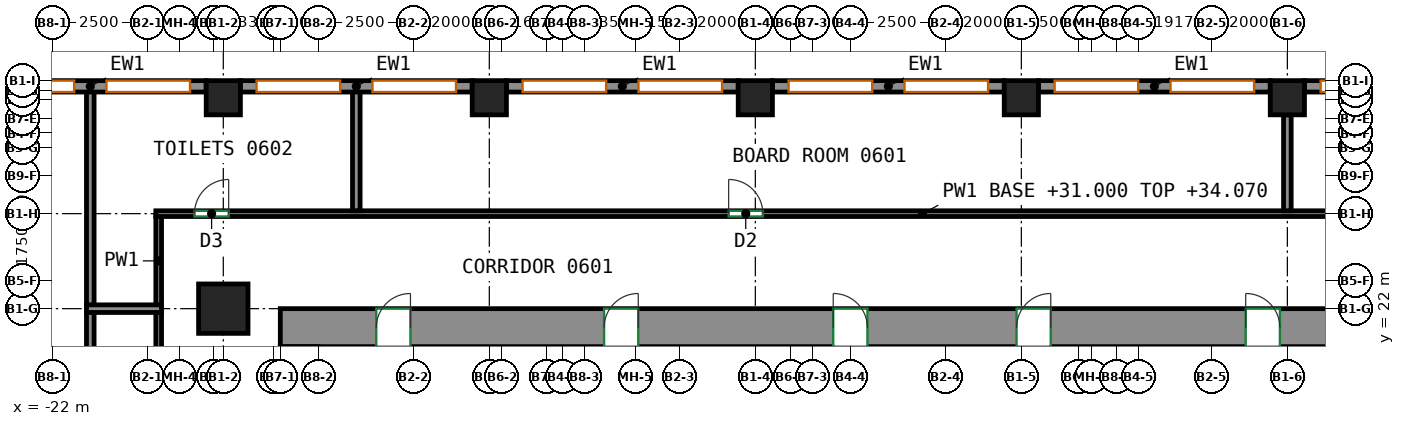
"""IFC4 building model, lengths in metres.
Left out: names, types, materials, properties, quantities, classifications, styles, units other than length and angle.
Written with IfcOpenShell. Run it as: python <this file> out.ifc"""

import sys

from ifc_helpers import new_model, si_unit, direction, frame, frame_2d, origin, origin_2d, place, context, subcontext, project, spatial, rectangle, extrude, source, transform, mapped, element, fill, save


model = new_model("IFC4")
c1 = context("Model", 3, precision=1e-05, world=origin(), true_north=direction((0.0, 1.0)))
c2 = subcontext(c1, "Body", "Model", "MODEL_VIEW")
j1 = project(units=[si_unit("LENGTHUNIT", "METRE"), si_unit("PLANEANGLEUNIT", "RADIAN")], contexts=[c1])
p1 = place(None, origin())
s1 = spatial("IfcSite", under=j1, at=p1, CompositionType="ELEMENT")
p2 = place(p1, origin())
s2 = spatial("IfcBuilding", under=s1, at=p2, CompositionType="ELEMENT")
p3 = place(p2, frame((0.0, 0.0, 31.0)))
s3 = spatial("IfcBuildingStorey", under=s2, at=p3, CompositionType="ELEMENT", Elevation=31.0)
m1 = source(origin(), c2, "Body", "SweptSolid", [
    extrude(rectangle(XDim=1.3, YDim=1.3, at=origin_2d()), origin(), (0.0, 0.0, 1.0), 3.72),
])
p4 = place(p3, frame((-17.5, 22.0, 0.0), z_axis=(0.0, 0.0, 1.0), x_axis=(1.0, 0.0, 0.0)))
e1 = element("IfcColumn", 1, at=p4, inside=s3, PredefinedType="COLUMN", context=c2, shape_type="MappedRepresentation", body=[
    mapped(m1, transform((0.0, 0.0, 0.0))),
])
m2 = source(origin(), c2, "Body", "SweptSolid", [
    extrude(rectangle(XDim=0.9, YDim=0.9, at=origin_2d()), origin(), (0.0, 0.0, 1.0), 3.72),
])
for number, where, z_axis, x_axis in (
    (2, (-17.5, 27.55, 0.0), (0.0, 0.0, 1.0), (1.0, 0.0, 0.0)),
    (3, (-10.5, 27.55, 0.0), (0.0, 0.0, 1.0), (1.0, 0.0, 0.0)),
    (4, (-3.5, 27.55, 0.0), (0.0, 0.0, 1.0), (1.0, 0.0, 0.0)),
    (5, (3.5, 27.55, 0.0), (0.0, 0.0, 1.0), (1.0, 0.0, 0.0)),
    (6, (10.5, 27.55, 0.0), (0.0, 0.0, 1.0), (1.0, 0.0, 0.0)),
):
    element("IfcColumn", number, at=place(p3, frame(where, z_axis=z_axis, x_axis=x_axis)), inside=s3, PredefinedType="COLUMN", context=c2, shape_type="MappedRepresentation", body=[
        mapped(m2, transform((0.0, 0.0, 0.0))),
    ])
m3 = source(origin(), c2, "Body", "SweptSolid", [
    extrude(rectangle(XDim=34.1, YDim=1.0, at=frame_2d((17.05, 0.0))), origin(), (0.0, 0.0, 1.0), 3.72),
])
p5 = place(p3, frame((-16.0, 21.5, 0.0), z_axis=(0.0, 0.0, 1.0), x_axis=(1.0, 0.0, 0.0)))
e7 = element("IfcWall", 7, at=p5, inside=s3, PredefinedType="SHEAR", context=c2, shape_type="MappedRepresentation", body=[
    mapped(m3, transform((0.0, 0.0, 0.0))),
])
p6 = place(p5, frame((8.52, 0.0, 0.0)))
e8 = element("IfcOpeningElement", 8, at=p6, cuts=e7, PredefinedType="OPENING", context=c2, shape_type="SweptSolid", body=[
    extrude(rectangle(XDim=0.9, YDim=2.1, at=frame_2d((0.45, 1.05))), frame((0.0, 0.51, 0.0), z_axis=(0.0, -1.0, 0.0), x_axis=(1.0, 0.0, 0.0)), (0.0, 0.0, 1.0), 1.02),
])
p7 = place(p5, frame((14.55, 0.0, 0.0)))
e9 = element("IfcOpeningElement", 9, at=p7, cuts=e7, PredefinedType="OPENING", context=c2, shape_type="SweptSolid", body=[
    extrude(rectangle(XDim=0.9, YDim=2.1, at=frame_2d((0.45, 1.05))), frame((0.0, 0.51, 0.0), z_axis=(0.0, -1.0, 0.0), x_axis=(1.0, 0.0, 0.0)), (0.0, 0.0, 1.0), 1.02),
])
p8 = place(p5, frame((19.374, 0.0, 0.0)))
e10 = element("IfcOpeningElement", 10, at=p8, cuts=e7, PredefinedType="OPENING", context=c2, shape_type="SweptSolid", body=[
    extrude(rectangle(XDim=0.9, YDim=2.1, at=frame_2d((0.45, 1.05))), frame((0.0, 0.51, 0.0), z_axis=(0.0, -1.0, 0.0), x_axis=(1.0, 0.0, 0.0)), (0.0, 0.0, 1.0), 1.02),
])
p9 = place(p5, frame((25.404, 0.0, 0.0)))
e11 = element("IfcOpeningElement", 11, at=p9, cuts=e7, PredefinedType="OPENING", context=c2, shape_type="SweptSolid", body=[
    extrude(rectangle(XDim=0.9, YDim=2.1, at=frame_2d((0.45, 1.05))), frame((0.0, 0.51, 0.0), z_axis=(0.0, -1.0, 0.0), x_axis=(1.0, 0.0, 0.0)), (0.0, 0.0, 1.0), 1.02),
])
p10 = place(p5, frame((2.525, 0.0, 0.0)))
e12 = element("IfcOpeningElement", 12, at=p10, cuts=e7, PredefinedType="OPENING", context=c2, shape_type="SweptSolid", body=[
    extrude(rectangle(XDim=0.9, YDim=2.1, at=frame_2d((0.45, 1.05))), frame((0.0, 0.51, 0.0), z_axis=(0.0, -1.0, 0.0), x_axis=(1.0, 0.0, 0.0)), (0.0, 0.0, 1.0), 1.02),
])
p11 = place(p5, frame((30.675, 0.0, 0.0)))
e13 = element("IfcOpeningElement", 13, at=p11, cuts=e7, PredefinedType="OPENING", context=c2, shape_type="SweptSolid", body=[
    extrude(rectangle(XDim=0.9, YDim=2.1, at=frame_2d((0.45, 1.05))), frame((0.0, 0.51, 0.0), z_axis=(0.0, -1.0, 0.0), x_axis=(1.0, 0.0, 0.0)), (0.0, 0.0, 1.0), 1.02),
])
m4 = source(origin(), c2, "Body", "SweptSolid", [
    extrude(rectangle(XDim=6.1, YDim=0.3, at=frame_2d((3.05, 0.0))), origin(), (0.0, 0.0, 1.0), 3.72),
])
p12 = place(p3, frame((17.05, 27.85, 0.0), z_axis=(0.0, 0.0, 1.0), x_axis=(-1.0, 0.0, 0.0)))
e14 = element("IfcWall", 14, at=p12, inside=s3, PredefinedType="SOLIDWALL", context=c2, shape_type="MappedRepresentation", body=[
    mapped(m4, transform((0.0, 0.0, 0.0))),
])
p13 = place(p12, frame((0.425, 0.0, 0.7)))
e15 = element("IfcOpeningElement", 15, at=p13, cuts=e14, PredefinedType="OPENING", context=c2, shape_type="SweptSolid", body=[
    extrude(rectangle(XDim=2.2, YDim=2.25, at=frame_2d((1.1, 1.125))), frame((0.0, 0.16, 0.0), z_axis=(0.0, -1.0, 0.0), x_axis=(1.0, 0.0, 0.0)), (0.0, 0.0, 1.0), 0.32),
])
p14 = place(p12, frame((3.475, 0.0, 0.7)))
e16 = element("IfcOpeningElement", 16, at=p14, cuts=e14, PredefinedType="OPENING", context=c2, shape_type="SweptSolid", body=[
    extrude(rectangle(XDim=2.2, YDim=2.25, at=frame_2d((1.1, 1.125))), frame((0.0, 0.16, 0.0), z_axis=(0.0, -1.0, 0.0), x_axis=(1.0, 0.0, 0.0)), (0.0, 0.0, 1.0), 0.32),
])
p15 = place(p3, frame((10.05, 27.85, 0.0), z_axis=(0.0, 0.0, 1.0), x_axis=(-1.0, 0.0, 0.0)))
e17 = element("IfcWall", 17, at=p15, inside=s3, PredefinedType="SOLIDWALL", context=c2, shape_type="MappedRepresentation", body=[
    mapped(m4, transform((0.0, 0.0, 0.0))),
])
p16 = place(p15, frame((0.425, 0.0, 0.7)))
e18 = element("IfcOpeningElement", 18, at=p16, cuts=e17, PredefinedType="OPENING", context=c2, shape_type="SweptSolid", body=[
    extrude(rectangle(XDim=2.2, YDim=2.25, at=frame_2d((1.1, 1.125))), frame((0.0, 0.16, 0.0), z_axis=(0.0, -1.0, 0.0), x_axis=(1.0, 0.0, 0.0)), (0.0, 0.0, 1.0), 0.32),
])
p17 = place(p15, frame((3.475, 0.0, 0.7)))
e19 = element("IfcOpeningElement", 19, at=p17, cuts=e17, PredefinedType="OPENING", context=c2, shape_type="SweptSolid", body=[
    extrude(rectangle(XDim=2.2, YDim=2.25, at=frame_2d((1.1, 1.125))), frame((0.0, 0.16, 0.0), z_axis=(0.0, -1.0, 0.0), x_axis=(1.0, 0.0, 0.0)), (0.0, 0.0, 1.0), 0.32),
])
p18 = place(p3, frame((3.05, 27.85, 0.0), z_axis=(0.0, 0.0, 1.0), x_axis=(-1.0, 0.0, 0.0)))
e20 = element("IfcWall", 20, at=p18, inside=s3, PredefinedType="SOLIDWALL", context=c2, shape_type="MappedRepresentation", body=[
    mapped(m4, transform((0.0, 0.0, 0.0))),
])
p19 = place(p18, frame((0.425, 0.0, 0.7)))
e21 = element("IfcOpeningElement", 21, at=p19, cuts=e20, PredefinedType="OPENING", context=c2, shape_type="SweptSolid", body=[
    extrude(rectangle(XDim=2.2, YDim=2.25, at=frame_2d((1.1, 1.125))), frame((0.0, 0.16, 0.0), z_axis=(0.0, -1.0, 0.0), x_axis=(1.0, 0.0, 0.0)), (0.0, 0.0, 1.0), 0.32),
])
p20 = place(p18, frame((3.475, 0.0, 0.7)))
e22 = element("IfcOpeningElement", 22, at=p20, cuts=e20, PredefinedType="OPENING", context=c2, shape_type="SweptSolid", body=[
    extrude(rectangle(XDim=2.2, YDim=2.25, at=frame_2d((1.1, 1.125))), frame((0.0, 0.16, 0.0), z_axis=(0.0, -1.0, 0.0), x_axis=(1.0, 0.0, 0.0)), (0.0, 0.0, 1.0), 0.32),
])
p21 = place(p3, frame((-3.95, 27.85, 0.0), z_axis=(0.0, 0.0, 1.0), x_axis=(-1.0, 0.0, 0.0)))
e23 = element("IfcWall", 23, at=p21, inside=s3, PredefinedType="SOLIDWALL", context=c2, shape_type="MappedRepresentation", body=[
    mapped(m4, transform((0.0, 0.0, 0.0))),
])
p22 = place(p21, frame((0.425, 0.0, 0.7)))
e24 = element("IfcOpeningElement", 24, at=p22, cuts=e23, PredefinedType="OPENING", context=c2, shape_type="SweptSolid", body=[
    extrude(rectangle(XDim=2.2, YDim=2.25, at=frame_2d((1.1, 1.125))), frame((0.0, 0.16, 0.0), z_axis=(0.0, -1.0, 0.0), x_axis=(1.0, 0.0, 0.0)), (0.0, 0.0, 1.0), 0.32),
])
p23 = place(p21, frame((3.475, 0.0, 0.7)))
e25 = element("IfcOpeningElement", 25, at=p23, cuts=e23, PredefinedType="OPENING", context=c2, shape_type="SweptSolid", body=[
    extrude(rectangle(XDim=2.2, YDim=2.25, at=frame_2d((1.1, 1.125))), frame((0.0, 0.16, 0.0), z_axis=(0.0, -1.0, 0.0), x_axis=(1.0, 0.0, 0.0)), (0.0, 0.0, 1.0), 0.32),
])
p24 = place(p3, frame((-10.95, 27.85, 0.0), z_axis=(0.0, 0.0, 1.0), x_axis=(-1.0, 0.0, 0.0)))
e26 = element("IfcWall", 26, at=p24, inside=s3, PredefinedType="SOLIDWALL", context=c2, shape_type="MappedRepresentation", body=[
    mapped(m4, transform((0.0, 0.0, 0.0))),
])
p25 = place(p24, frame((0.425, 0.0, 0.7)))
e27 = element("IfcOpeningElement", 27, at=p25, cuts=e26, PredefinedType="OPENING", context=c2, shape_type="SweptSolid", body=[
    extrude(rectangle(XDim=2.2, YDim=2.25, at=frame_2d((1.1, 1.125))), frame((0.0, 0.16, 0.0), z_axis=(0.0, -1.0, 0.0), x_axis=(1.0, 0.0, 0.0)), (0.0, 0.0, 1.0), 0.32),
])
p26 = place(p24, frame((3.475, 0.0, 0.7)))
e28 = element("IfcOpeningElement", 28, at=p26, cuts=e26, PredefinedType="OPENING", context=c2, shape_type="SweptSolid", body=[
    extrude(rectangle(XDim=2.2, YDim=2.25, at=frame_2d((1.1, 1.125))), frame((0.0, 0.16, 0.0), z_axis=(0.0, -1.0, 0.0), x_axis=(1.0, 0.0, 0.0)), (0.0, 0.0, 1.0), 0.32),
])
p27 = place(p3, frame((-17.95, 27.85, 0.0), z_axis=(0.0, 0.0, 1.0), x_axis=(-1.0, 0.0, 0.0)))
e29 = element("IfcWall", 29, at=p27, inside=s3, PredefinedType="SOLIDWALL", context=c2, shape_type="MappedRepresentation", body=[
    mapped(m4, transform((0.0, 0.0, 0.0))),
])
p28 = place(p27, frame((0.425, 0.0, 0.7)))
e30 = element("IfcOpeningElement", 30, at=p28, cuts=e29, PredefinedType="OPENING", context=c2, shape_type="SweptSolid", body=[
    extrude(rectangle(XDim=2.2, YDim=2.25, at=frame_2d((1.1, 1.125))), frame((0.0, 0.16, 0.0), z_axis=(0.0, -1.0, 0.0), x_axis=(1.0, 0.0, 0.0)), (0.0, 0.0, 1.0), 0.32),
])
p29 = place(p27, frame((3.475, 0.0, 0.7)))
e31 = element("IfcOpeningElement", 31, at=p29, cuts=e29, PredefinedType="OPENING", context=c2, shape_type="SweptSolid", body=[
    extrude(rectangle(XDim=2.2, YDim=2.25, at=frame_2d((1.1, 1.125))), frame((0.0, 0.16, 0.0), z_axis=(0.0, -1.0, 0.0), x_axis=(1.0, 0.0, 0.0)), (0.0, 0.0, 1.0), 0.32),
])
p30 = place(p3, frame((-19.2, 22.09, 0.0), z_axis=(0.0, 0.0, 1.0), x_axis=(0.0, 1.0, 0.0)))
e32 = element("IfcWall", 32, at=p30, inside=s3, PredefinedType="PARTITIONING", context=c2, shape_type="SweptSolid", body=[
    extrude(rectangle(XDim=2.335, YDim=0.15, at=frame_2d((1.167, 0.0))), origin(), (0.0, 0.0, 1.0), 3.72),
])
p31 = place(p3, frame((-19.275, 24.5, 0.0), z_axis=(0.0, 0.0, 1.0), x_axis=(1.0, 0.0, 0.0)))
e33 = element("IfcWall", 33, at=p31, inside=s3, PredefinedType="PARTITIONING", context=c2, shape_type="SweptSolid", body=[
    extrude(rectangle(XDim=40.35, YDim=0.15, at=frame_2d((20.175, 0.0))), origin(), (0.0, 0.0, 1.0), 3.07),
])
p32 = place(p31, frame((1.017, 0.0, 0.0)))
e34 = element("IfcOpeningElement", 34, at=p32, cuts=e33, PredefinedType="OPENING", context=c2, shape_type="SweptSolid", body=[
    extrude(rectangle(XDim=0.9, YDim=2.1, at=frame_2d((0.45, 1.05))), frame((0.0, 0.085, 0.0), z_axis=(0.0, -1.0, 0.0), x_axis=(1.0, 0.0, 0.0)), (0.0, 0.0, 1.0), 0.17),
])
p33 = place(p31, frame((15.073, 0.0, 0.0)))
e35 = element("IfcOpeningElement", 35, at=p33, cuts=e33, PredefinedType="OPENING", context=c2, shape_type="SweptSolid", body=[
    extrude(rectangle(XDim=0.9, YDim=2.1, at=frame_2d((0.45, 1.05))), frame((0.0, 0.085, 0.0), z_axis=(0.0, -1.0, 0.0), x_axis=(1.0, 0.0, 0.0)), (0.0, 0.0, 1.0), 0.17),
])
p34 = place(p31, frame((32.791, 0.0, 0.0)))
e36 = element("IfcOpeningElement", 36, at=p34, cuts=e33, PredefinedType="OPENING", context=c2, shape_type="SweptSolid", body=[
    extrude(rectangle(XDim=1.0, YDim=2.1, at=frame_2d((0.5, 1.05))), frame((0.0, 0.085, 0.0), z_axis=(0.0, -1.0, 0.0), x_axis=(1.0, 0.0, 0.0)), (0.0, 0.0, 1.0), 0.17),
])
p35 = place(p3, frame((-19.2, 8.09, 0.0), z_axis=(0.0, 0.0, 1.0), x_axis=(0.0, 1.0, 0.0)))
e37 = element("IfcWall", 37, at=p35, inside=s3, PredefinedType="PARTITIONING", context=c2, shape_type="SweptSolid", body=[
    extrude(rectangle(XDim=13.82, YDim=0.15, at=frame_2d((6.91, 0.0))), origin(), (0.0, 0.0, 1.0), 3.72),
])
p36 = place(p35, frame((11.919, 0.0, 0.0)))
e38 = element("IfcOpeningElement", 38, at=p36, cuts=e37, PredefinedType="OPENING", context=c2, shape_type="SweptSolid", body=[
    extrude(rectangle(XDim=0.9, YDim=2.1, at=frame_2d((0.45, 1.05))), frame((0.0, 0.085, 0.0), z_axis=(0.0, -1.0, 0.0), x_axis=(1.0, 0.0, 0.0)), (0.0, 0.0, 1.0), 0.17),
])
p37 = place(p3, frame((-21.0, 22.09, 0.0), z_axis=(0.0, 0.0, 1.0), x_axis=(0.0, 1.0, 0.0)))
e39 = element("IfcWall", 39, at=p37, inside=s3, PredefinedType="PARTITIONING", context=c2, shape_type="SweptSolid", body=[
    extrude(rectangle(XDim=5.66, YDim=0.2, at=frame_2d((2.83, 0.0))), origin(), (0.0, 0.0, 1.0), 3.72),
])
p38 = place(p3, frame((-21.0, 8.1, 0.0), z_axis=(0.0, 0.0, 1.0), x_axis=(0.0, 1.0, 0.0)))
e40 = element("IfcWall", 40, at=p38, inside=s3, PredefinedType="PARTITIONING", context=c2, shape_type="SweptSolid", body=[
    extrude(rectangle(XDim=13.81, YDim=0.2, at=frame_2d((6.905, 0.0))), origin(), (0.0, 0.0, 1.0), 3.72),
])
p39 = place(p3, frame((10.5, 24.576, 0.0), z_axis=(0.0, 0.0, 1.0), x_axis=(0.0, 1.0, 0.0)))
e41 = element("IfcWall", 41, at=p39, inside=s3, PredefinedType="PARTITIONING", context=c2, shape_type="SweptSolid", body=[
    extrude(rectangle(XDim=2.524, YDim=0.2, at=frame_2d((1.262, 0.0))), origin(), (0.0, 0.0, 1.0), 3.72),
])
p40 = place(p3, frame((-14.0, 24.576, 0.0), z_axis=(0.0, 0.0, 1.0), x_axis=(0.0, 1.0, 0.0)))
e42 = element("IfcWall", 42, at=p40, inside=s3, PredefinedType="PARTITIONING", context=c2, shape_type="SweptSolid", body=[
    extrude(rectangle(XDim=3.174, YDim=0.2, at=frame_2d((1.587, 0.0))), origin(), (0.0, 0.0, 1.0), 3.72),
])
p41 = place(p3, frame((-21.1, 22.0, 0.0), z_axis=(0.0, 0.0, 1.0), x_axis=(1.0, 0.0, 0.0)))
e43 = element("IfcWall", 43, at=p41, inside=s3, PredefinedType="PARTITIONING", context=c2, shape_type="SweptSolid", body=[
    extrude(rectangle(XDim=1.974, YDim=0.2, at=frame_2d((0.987, 0.0))), origin(), (0.0, 0.0, 1.0), 3.72),
])
p42 = place(p14, origin())
e44 = element("IfcWindow", 44, at=p42, inside=s3, PartitioningType="SINGLE_PANEL", PredefinedType="WINDOW", context=c2, shape_type="SweptSolid", body=[
    extrude(rectangle(XDim=2.2, YDim=2.25, at=frame_2d((1.1, 1.125))), frame((0.0, 0.03, 0.0), z_axis=(0.0, -1.0, 0.0), x_axis=(1.0, 0.0, 0.0)), (0.0, 0.0, 1.0), 0.06),
])
fill(e16, e44)
p43 = place(p16, origin())
e45 = element("IfcWindow", 45, at=p43, inside=s3, PartitioningType="SINGLE_PANEL", PredefinedType="WINDOW", context=c2, shape_type="SweptSolid", body=[
    extrude(rectangle(XDim=2.2, YDim=2.25, at=frame_2d((1.1, 1.125))), frame((0.0, 0.03, 0.0), z_axis=(0.0, -1.0, 0.0), x_axis=(1.0, 0.0, 0.0)), (0.0, 0.0, 1.0), 0.06),
])
fill(e18, e45)
p44 = place(p17, origin())
e46 = element("IfcWindow", 46, at=p44, inside=s3, PartitioningType="SINGLE_PANEL", PredefinedType="WINDOW", context=c2, shape_type="SweptSolid", body=[
    extrude(rectangle(XDim=2.2, YDim=2.25, at=frame_2d((1.1, 1.125))), frame((0.0, 0.03, 0.0), z_axis=(0.0, -1.0, 0.0), x_axis=(1.0, 0.0, 0.0)), (0.0, 0.0, 1.0), 0.06),
])
fill(e19, e46)
p45 = place(p19, origin())
e47 = element("IfcWindow", 47, at=p45, inside=s3, PartitioningType="SINGLE_PANEL", PredefinedType="WINDOW", context=c2, shape_type="SweptSolid", body=[
    extrude(rectangle(XDim=2.2, YDim=2.25, at=frame_2d((1.1, 1.125))), frame((0.0, 0.03, 0.0), z_axis=(0.0, -1.0, 0.0), x_axis=(1.0, 0.0, 0.0)), (0.0, 0.0, 1.0), 0.06),
])
fill(e21, e47)
p46 = place(p20, origin())
e48 = element("IfcWindow", 48, at=p46, inside=s3, PartitioningType="SINGLE_PANEL", PredefinedType="WINDOW", context=c2, shape_type="SweptSolid", body=[
    extrude(rectangle(XDim=2.2, YDim=2.25, at=frame_2d((1.1, 1.125))), frame((0.0, 0.03, 0.0), z_axis=(0.0, -1.0, 0.0), x_axis=(1.0, 0.0, 0.0)), (0.0, 0.0, 1.0), 0.06),
])
fill(e22, e48)
p47 = place(p22, origin())
e49 = element("IfcWindow", 49, at=p47, inside=s3, PartitioningType="SINGLE_PANEL", PredefinedType="WINDOW", context=c2, shape_type="SweptSolid", body=[
    extrude(rectangle(XDim=2.2, YDim=2.25, at=frame_2d((1.1, 1.125))), frame((0.0, 0.03, 0.0), z_axis=(0.0, -1.0, 0.0), x_axis=(1.0, 0.0, 0.0)), (0.0, 0.0, 1.0), 0.06),
])
fill(e24, e49)
p48 = place(p23, origin())
e50 = element("IfcWindow", 50, at=p48, inside=s3, PartitioningType="SINGLE_PANEL", PredefinedType="WINDOW", context=c2, shape_type="SweptSolid", body=[
    extrude(rectangle(XDim=2.2, YDim=2.25, at=frame_2d((1.1, 1.125))), frame((0.0, 0.03, 0.0), z_axis=(0.0, -1.0, 0.0), x_axis=(1.0, 0.0, 0.0)), (0.0, 0.0, 1.0), 0.06),
])
fill(e25, e50)
p49 = place(p25, origin())
e51 = element("IfcWindow", 51, at=p49, inside=s3, PartitioningType="SINGLE_PANEL", PredefinedType="WINDOW", context=c2, shape_type="SweptSolid", body=[
    extrude(rectangle(XDim=2.2, YDim=2.25, at=frame_2d((1.1, 1.125))), frame((0.0, 0.03, 0.0), z_axis=(0.0, -1.0, 0.0), x_axis=(1.0, 0.0, 0.0)), (0.0, 0.0, 1.0), 0.06),
])
fill(e27, e51)
p50 = place(p26, origin())
e52 = element("IfcWindow", 52, at=p50, inside=s3, PartitioningType="SINGLE_PANEL", PredefinedType="WINDOW", context=c2, shape_type="SweptSolid", body=[
    extrude(rectangle(XDim=2.2, YDim=2.25, at=frame_2d((1.1, 1.125))), frame((0.0, 0.03, 0.0), z_axis=(0.0, -1.0, 0.0), x_axis=(1.0, 0.0, 0.0)), (0.0, 0.0, 1.0), 0.06),
])
fill(e28, e52)
p51 = place(p28, origin())
e53 = element("IfcWindow", 53, at=p51, inside=s3, PartitioningType="SINGLE_PANEL", PredefinedType="WINDOW", context=c2, shape_type="SweptSolid", body=[
    extrude(rectangle(XDim=2.2, YDim=2.25, at=frame_2d((1.1, 1.125))), frame((0.0, 0.03, 0.0), z_axis=(0.0, -1.0, 0.0), x_axis=(1.0, 0.0, 0.0)), (0.0, 0.0, 1.0), 0.06),
])
fill(e30, e53)
p52 = place(p29, origin())
e54 = element("IfcWindow", 54, at=p52, inside=s3, PartitioningType="SINGLE_PANEL", PredefinedType="WINDOW", context=c2, shape_type="SweptSolid", body=[
    extrude(rectangle(XDim=2.2, YDim=2.25, at=frame_2d((1.1, 1.125))), frame((0.0, 0.03, 0.0), z_axis=(0.0, -1.0, 0.0), x_axis=(1.0, 0.0, 0.0)), (0.0, 0.0, 1.0), 0.06),
])
fill(e31, e54)
p53 = place(p6, origin())
e55 = element("IfcDoor", 55, at=p53, inside=s3, OperationType="SINGLE_SWING_RIGHT", PredefinedType="DOOR", context=c2, shape_type="SweptSolid", body=[
    extrude(rectangle(XDim=0.9, YDim=2.1, at=frame_2d((0.45, 1.05))), frame((0.0, -0.355, 0.0), z_axis=(0.0, -1.0, 0.0), x_axis=(1.0, 0.0, 0.0)), (0.0, 0.0, 1.0), 0.05),
])
fill(e8, e55)
p54 = place(p7, origin())
e56 = element("IfcDoor", 56, at=p54, inside=s3, OperationType="SINGLE_SWING_LEFT", PredefinedType="DOOR", context=c2, shape_type="SweptSolid", body=[
    extrude(rectangle(XDim=0.9, YDim=2.1, at=frame_2d((0.45, 1.05))), frame((0.0, -0.355, 0.0), z_axis=(0.0, -1.0, 0.0), x_axis=(1.0, 0.0, 0.0)), (0.0, 0.0, 1.0), 0.05),
])
fill(e9, e56)
p55 = place(p8, origin())
e57 = element("IfcDoor", 57, at=p55, inside=s3, OperationType="SINGLE_SWING_RIGHT", PredefinedType="DOOR", context=c2, shape_type="SweptSolid", body=[
    extrude(rectangle(XDim=0.9, YDim=2.1, at=frame_2d((0.45, 1.05))), frame((0.0, -0.355, 0.0), z_axis=(0.0, -1.0, 0.0), x_axis=(1.0, 0.0, 0.0)), (0.0, 0.0, 1.0), 0.05),
])
fill(e10, e57)
p56 = place(p9, origin())
e58 = element("IfcDoor", 58, at=p56, inside=s3, OperationType="SINGLE_SWING_LEFT", PredefinedType="DOOR", context=c2, shape_type="SweptSolid", body=[
    extrude(rectangle(XDim=0.9, YDim=2.1, at=frame_2d((0.45, 1.05))), frame((0.0, -0.355, 0.0), z_axis=(0.0, -1.0, 0.0), x_axis=(1.0, 0.0, 0.0)), (0.0, 0.0, 1.0), 0.05),
])
fill(e11, e58)
p57 = place(p10, origin())
e59 = element("IfcDoor", 59, at=p57, inside=s3, OperationType="SINGLE_SWING_RIGHT", PredefinedType="DOOR", context=c2, shape_type="SweptSolid", body=[
    extrude(rectangle(XDim=0.9, YDim=2.1, at=frame_2d((0.45, 1.05))), frame((0.0, -0.355, 0.0), z_axis=(0.0, -1.0, 0.0), x_axis=(1.0, 0.0, 0.0)), (0.0, 0.0, 1.0), 0.05),
])
fill(e12, e59)
p58 = place(p32, origin())
e60 = element("IfcDoor", 60, at=p58, inside=s3, OperationType="SINGLE_SWING_RIGHT", PredefinedType="DOOR", context=c2, shape_type="SweptSolid", body=[
    extrude(rectangle(XDim=0.9, YDim=2.1, at=frame_2d((0.45, 1.05))), frame((0.0, 0.025, 0.0), z_axis=(0.0, -1.0, 0.0), x_axis=(1.0, 0.0, 0.0)), (0.0, 0.0, 1.0), 0.05),
])
fill(e34, e60)
p59 = place(p33, origin())
e61 = element("IfcDoor", 61, at=p59, inside=s3, OperationType="SINGLE_SWING_LEFT", PredefinedType="DOOR", context=c2, shape_type="SweptSolid", body=[
    extrude(rectangle(XDim=0.9, YDim=2.1, at=frame_2d((0.45, 1.05))), frame((0.0, 0.025, 0.0), z_axis=(0.0, -1.0, 0.0), x_axis=(1.0, 0.0, 0.0)), (0.0, 0.0, 1.0), 0.05),
])
fill(e35, e61)
save(model, sys.argv[1])
